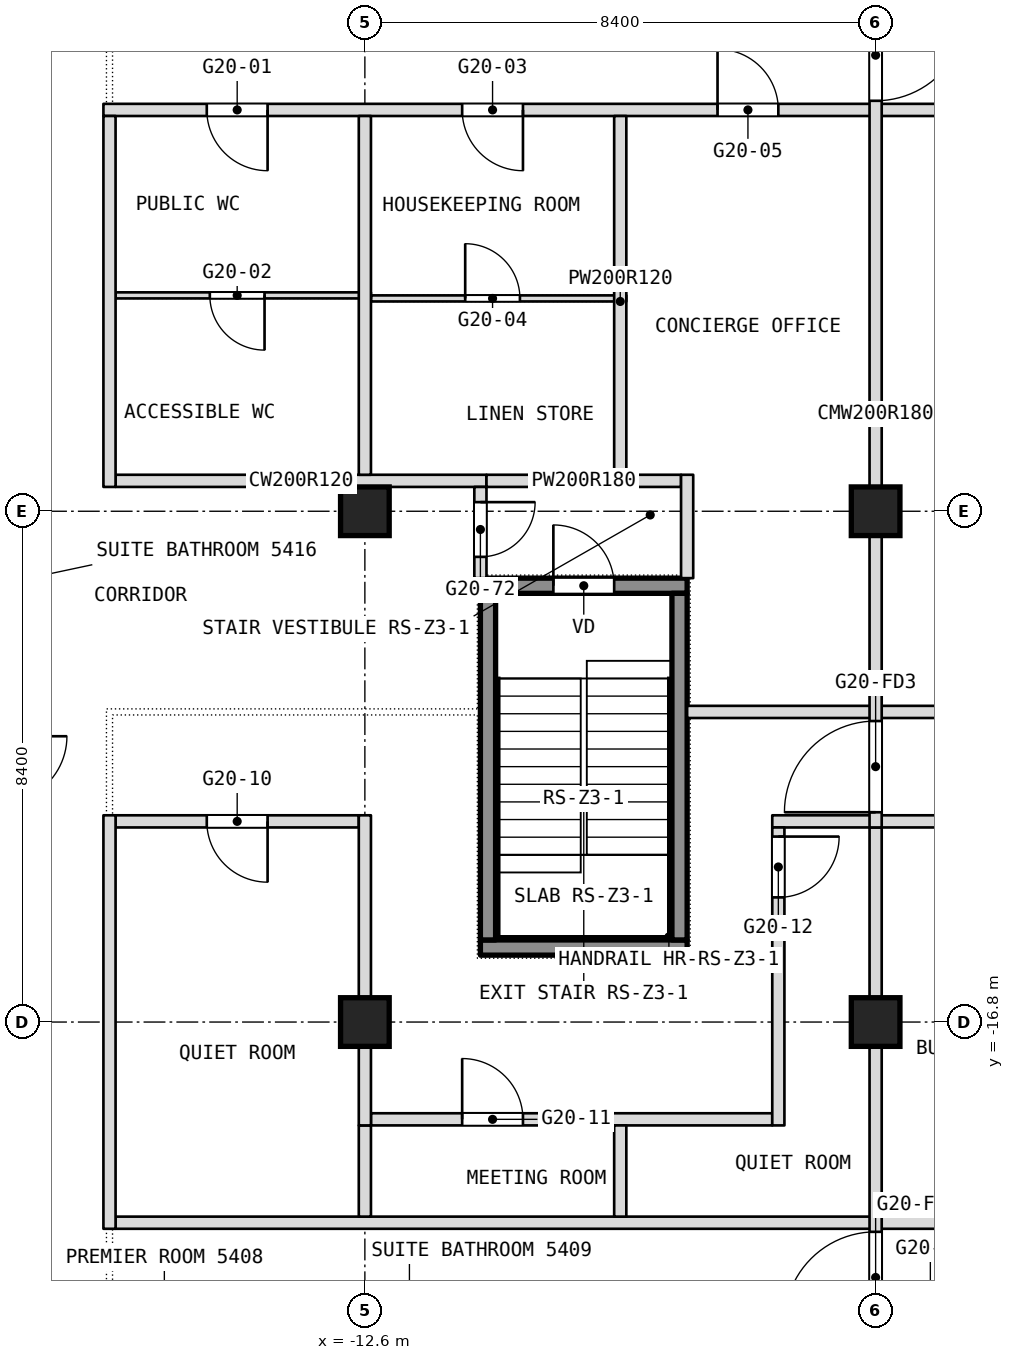
"""IFC4 building model, lengths in metres.
Left out: names, types, materials, properties, quantities, classifications, styles, units other than length and angle.
Written with IfcOpenShell. Run it as: python <this file> out.ifc"""

import sys

from ifc_helpers import new_model, si_unit, direction, frame, frame_2d, origin, origin_2d, place, context, subcontext, project, spatial, rectangle, extrude, element, fill, save


model = new_model("IFC4")
c1 = context("Model", 3, precision=1e-05, world=origin(), true_north=direction((0.0, 1.0)))
c2 = subcontext(c1, "Body", "Model", "MODEL_VIEW")
j1 = project(units=[si_unit("LENGTHUNIT", "METRE"), si_unit("PLANEANGLEUNIT", "RADIAN")], contexts=[c1])
p1 = place(None, origin())
s1 = spatial("IfcSite", under=j1, at=p1, CompositionType="ELEMENT")
p2 = place(p1, origin())
s2 = spatial("IfcBuilding", under=s1, at=p2, CompositionType="ELEMENT")
p3 = place(p2, frame((0.0, 0.0, 230.9)))
s3 = spatial("IfcBuildingStorey", under=s2, at=p3, CompositionType="ELEMENT", Elevation=230.9)
for number, where, z_axis, x_axis in (
    (1, (-12.6, -16.8, 0.0), (0.0, 0.0, 1.0), (1.0, 0.0, 0.0)),
    (2, (-12.6, -8.4, 0.0), (0.0, 0.0, 1.0), (1.0, 0.0, 0.0)),
    (3, (-4.2, -16.8, 0.0), (0.0, 0.0, 1.0), (1.0, 0.0, 0.0)),
    (4, (-4.2, -8.4, 0.0), (0.0, 0.0, 1.0), (1.0, 0.0, 0.0)),
):
    element("IfcColumn", number, at=place(p3, frame(where, z_axis=z_axis, x_axis=x_axis)), inside=s3, PredefinedType="COLUMN", context=c2, shape_type="SweptSolid", body=[
        extrude(rectangle(XDim=0.8, YDim=0.8, at=origin_2d()), origin(), (0.0, 0.0, 1.0), 3.6),
    ])
p4 = place(p3, frame((-16.7, -20.1, 0.0), z_axis=(0.0, 0.0, 1.0), x_axis=(1.0, 0.0, 0.0)))
e5 = element("IfcWall", 5, at=p4, inside=s3, PredefinedType="PARTITIONING", context=c2, shape_type="SweptSolid", body=[
    extrude(rectangle(XDim=33.4, YDim=0.2, at=frame_2d((16.7, 0.0))), origin(), (0.0, 0.0, 1.0), 3.34),
])
p5 = place(p3, frame((-12.5, -18.4, 0.0), z_axis=(0.0, 0.0, 1.0), x_axis=(1.0, 0.0, 0.0)))
e6 = element("IfcWall", 6, at=p5, inside=s3, PredefinedType="PARTITIONING", context=c2, shape_type="SweptSolid", body=[
    extrude(rectangle(XDim=6.6, YDim=0.2, at=frame_2d((3.3, 0.0))), origin(), (0.0, 0.0, 1.0), 3.34),
])
p6 = place(p5, frame((1.5, 0.0, 0.0)))
e7 = element("IfcOpeningElement", 7, at=p6, cuts=e6, PredefinedType="OPENING", context=c2, shape_type="SweptSolid", body=[
    extrude(rectangle(XDim=1.0, YDim=2.1, at=frame_2d((0.5, 1.05))), frame((0.0, 0.1, 0.0), z_axis=(0.0, -1.0, 0.0), x_axis=(1.0, 0.0, 0.0)), (0.0, 0.0, 1.0), 0.2),
])
p7 = place(p3, frame((-16.7, -13.5, 0.0), z_axis=(0.0, 0.0, 1.0), x_axis=(1.0, 0.0, 0.0)))
e8 = element("IfcWall", 8, at=p7, inside=s3, PredefinedType="PARTITIONING", context=c2, shape_type="SweptSolid", body=[
    extrude(rectangle(XDim=4.0, YDim=0.2, at=frame_2d((2.0, 0.0))), origin(), (0.0, 0.0, 1.0), 3.34),
])
p8 = place(p7, frame((1.5, 0.0, 0.0)))
e9 = element("IfcOpeningElement", 9, at=p8, cuts=e8, PredefinedType="OPENING", context=c2, shape_type="SweptSolid", body=[
    extrude(rectangle(XDim=1.0, YDim=2.1, at=frame_2d((0.5, 1.05))), frame((0.0, 0.1, 0.0), z_axis=(0.0, -1.0, 0.0), x_axis=(1.0, 0.0, 0.0)), (0.0, 0.0, 1.0), 0.2),
])
p9 = place(p3, frame((-5.9, -13.5, 0.0), z_axis=(0.0, 0.0, 1.0), x_axis=(1.0, 0.0, 0.0)))
e10 = element("IfcWall", 10, at=p9, inside=s3, PredefinedType="PARTITIONING", context=c2, shape_type="SweptSolid", body=[
    extrude(rectangle(XDim=11.6, YDim=0.2, at=frame_2d((5.8, 0.0))), origin(), (0.0, 0.0, 1.0), 3.34),
])
p10 = place(p9, frame((3.3, 0.0, 0.0)))
e11 = element("IfcOpeningElement", 11, at=p10, cuts=e10, PredefinedType="OPENING", context=c2, shape_type="SweptSolid", body=[
    extrude(rectangle(XDim=1.0, YDim=2.1, at=frame_2d((0.5, 1.05))), frame((0.0, 0.1, 0.0), z_axis=(0.0, -1.0, 0.0), x_axis=(1.0, 0.0, 0.0)), (0.0, 0.0, 1.0), 0.2),
])
p11 = place(p9, frame((7.5, 0.0, 0.0)))
e12 = element("IfcOpeningElement", 12, at=p11, cuts=e10, PredefinedType="OPENING", context=c2, shape_type="SweptSolid", body=[
    extrude(rectangle(XDim=1.0, YDim=2.1, at=frame_2d((0.5, 1.05))), frame((0.0, 0.1, 0.0), z_axis=(0.0, -1.0, 0.0), x_axis=(1.0, 0.0, 0.0)), (0.0, 0.0, 1.0), 0.2),
])
p12 = place(p3, frame((-7.3, -11.7, 0.0), z_axis=(0.0, 0.0, 1.0), x_axis=(1.0, 0.0, 0.0)))
e13 = element("IfcWall", 13, at=p12, inside=s3, PredefinedType="PARTITIONING", context=c2, shape_type="SweptSolid", body=[
    extrude(rectangle(XDim=14.6, YDim=0.2, at=frame_2d((7.3, 0.0))), origin(), (0.0, 0.0, 1.0), 3.34),
])
p13 = place(p3, frame((-16.7, -7.9, 0.0), z_axis=(0.0, 0.0, 1.0), x_axis=(1.0, 0.0, 0.0)))
e14 = element("IfcWall", 14, at=p13, inside=s3, PredefinedType="PARTITIONING", context=c2, shape_type="SweptSolid", body=[
    extrude(rectangle(XDim=6.1, YDim=0.2, at=frame_2d((3.05, 0.0))), origin(), (0.0, 0.0, 1.0), 3.34),
])
p14 = place(p3, frame((-10.6, -7.9, 0.0), z_axis=(0.0, 0.0, 1.0), x_axis=(1.0, 0.0, 0.0)))
e15 = element("IfcWall", 15, at=p14, inside=s3, PredefinedType="PARTITIONING", context=c2, shape_type="SweptSolid", body=[
    extrude(rectangle(XDim=3.2, YDim=0.2, at=frame_2d((1.6, 0.0))), origin(), (0.0, 0.0, 1.0), 3.34),
])
p15 = place(p3, frame((-12.5, -4.9, 0.0), z_axis=(0.0, 0.0, 1.0), x_axis=(1.0, 0.0, 0.0)))
e16 = element("IfcWall", 16, at=p15, inside=s3, PredefinedType="PARTITIONING", context=c2, shape_type="SweptSolid", body=[
    extrude(rectangle(XDim=4.2, YDim=0.1, at=frame_2d((2.1, 0.0))), origin(), (0.0, 0.0, 1.0), 3.34),
])
p16 = place(p15, frame((1.55, 0.0, 0.0)))
e17 = element("IfcOpeningElement", 17, at=p16, cuts=e16, PredefinedType="OPENING", context=c2, shape_type="SweptSolid", body=[
    extrude(rectangle(XDim=0.9, YDim=2.1, at=frame_2d((0.45, 1.05))), frame((0.0, 0.05, 0.0), z_axis=(0.0, -1.0, 0.0), x_axis=(1.0, 0.0, 0.0)), (0.0, 0.0, 1.0), 0.1),
])
p17 = place(p3, frame((-16.7, -4.85, 0.0), z_axis=(0.0, 0.0, 1.0), x_axis=(1.0, 0.0, 0.0)))
e18 = element("IfcWall", 18, at=p17, inside=s3, PredefinedType="PARTITIONING", context=c2, shape_type="SweptSolid", body=[
    extrude(rectangle(XDim=4.2, YDim=0.1, at=frame_2d((2.1, 0.0))), origin(), (0.0, 0.0, 1.0), 3.34),
])
p18 = place(p17, frame((1.55, 0.0, 0.0)))
e19 = element("IfcOpeningElement", 19, at=p18, cuts=e18, PredefinedType="OPENING", context=c2, shape_type="SweptSolid", body=[
    extrude(rectangle(XDim=0.9, YDim=2.1, at=frame_2d((0.45, 1.05))), frame((0.0, 0.05, 0.0), z_axis=(0.0, -1.0, 0.0), x_axis=(1.0, 0.0, 0.0)), (0.0, 0.0, 1.0), 0.1),
])
p19 = place(p3, frame((-16.9, -1.8, 0.0), z_axis=(0.0, 0.0, 1.0), x_axis=(1.0, 0.0, 0.0)))
e20 = element("IfcWall", 20, at=p19, inside=s3, PredefinedType="PARTITIONING", context=c2, shape_type="SweptSolid", body=[
    extrude(rectangle(XDim=33.8, YDim=0.2, at=frame_2d((16.9, 0.0))), origin(), (0.0, 0.0, 1.0), 3.34),
])
p20 = place(p19, frame((1.7, 0.0, 0.0)))
e21 = element("IfcOpeningElement", 21, at=p20, cuts=e20, PredefinedType="OPENING", context=c2, shape_type="SweptSolid", body=[
    extrude(rectangle(XDim=1.0, YDim=2.1, at=frame_2d((0.5, 1.05))), frame((0.0, 0.1, 0.0), z_axis=(0.0, -1.0, 0.0), x_axis=(1.0, 0.0, 0.0)), (0.0, 0.0, 1.0), 0.2),
])
p21 = place(p19, frame((5.9, 0.0, 0.0)))
e22 = element("IfcOpeningElement", 22, at=p21, cuts=e20, PredefinedType="OPENING", context=c2, shape_type="SweptSolid", body=[
    extrude(rectangle(XDim=1.0, YDim=2.1, at=frame_2d((0.5, 1.05))), frame((0.0, 0.1, 0.0), z_axis=(0.0, -1.0, 0.0), x_axis=(1.0, 0.0, 0.0)), (0.0, 0.0, 1.0), 0.2),
])
p22 = place(p19, frame((10.1, 0.0, 0.0)))
e23 = element("IfcOpeningElement", 23, at=p22, cuts=e20, PredefinedType="OPENING", context=c2, shape_type="SweptSolid", body=[
    extrude(rectangle(XDim=1.0, YDim=2.1, at=frame_2d((0.5, 1.05))), frame((0.0, 0.1, 0.0), z_axis=(0.0, -1.0, 0.0), x_axis=(1.0, 0.0, 0.0)), (0.0, 0.0, 1.0), 0.2),
])
p23 = place(p19, frame((16.0, 0.0, 0.0)))
e24 = element("IfcOpeningElement", 24, at=p23, cuts=e20, PredefinedType="OPENING", context=c2, shape_type="SweptSolid", body=[
    extrude(rectangle(XDim=1.8, YDim=2.1, at=frame_2d((0.9, 1.05))), frame((0.0, 0.1, 0.0), z_axis=(0.0, -1.0, 0.0), x_axis=(1.0, 0.0, 0.0)), (0.0, 0.0, 1.0), 0.2),
])
p24 = place(p19, frame((22.7, 0.0, 0.0)))
e25 = element("IfcOpeningElement", 25, at=p24, cuts=e20, PredefinedType="OPENING", context=c2, shape_type="SweptSolid", body=[
    extrude(rectangle(XDim=1.0, YDim=2.1, at=frame_2d((0.5, 1.05))), frame((0.0, 0.1, 0.0), z_axis=(0.0, -1.0, 0.0), x_axis=(1.0, 0.0, 0.0)), (0.0, 0.0, 1.0), 0.2),
])
p25 = place(p19, frame((26.9, 0.0, 0.0)))
e26 = element("IfcOpeningElement", 26, at=p25, cuts=e20, PredefinedType="OPENING", context=c2, shape_type="SweptSolid", body=[
    extrude(rectangle(XDim=1.0, YDim=2.1, at=frame_2d((0.5, 1.05))), frame((0.0, 0.1, 0.0), z_axis=(0.0, -1.0, 0.0), x_axis=(1.0, 0.0, 0.0)), (0.0, 0.0, 1.0), 0.2),
])
p26 = place(p19, frame((31.1, 0.0, 0.0)))
e27 = element("IfcOpeningElement", 27, at=p26, cuts=e20, PredefinedType="OPENING", context=c2, shape_type="SweptSolid", body=[
    extrude(rectangle(XDim=1.0, YDim=2.1, at=frame_2d((0.5, 1.05))), frame((0.0, 0.1, 0.0), z_axis=(0.0, -1.0, 0.0), x_axis=(1.0, 0.0, 0.0)), (0.0, 0.0, 1.0), 0.2),
])
p27 = place(p3, frame((-4.2, -22.0, 0.0), z_axis=(0.0, 0.0, 1.0), x_axis=(0.0, 1.0, 0.0)))
e28 = element("IfcWall", 28, at=p27, inside=s3, PredefinedType="PARTITIONING", context=c2, shape_type="SweptSolid", body=[
    extrude(rectangle(XDim=8.4, YDim=0.2, at=frame_2d((4.2, 0.0))), origin(), (0.0, 0.0, 1.0), 3.34),
])
p28 = place(p27, frame((0.25, 0.0, 0.0)))
e29 = element("IfcOpeningElement", 29, at=p28, cuts=e28, PredefinedType="OPENING", context=c2, shape_type="SweptSolid", body=[
    extrude(rectangle(XDim=1.5, YDim=2.1, at=frame_2d((0.75, 1.05))), frame((0.0, 0.1, 0.0), z_axis=(0.0, -1.0, 0.0), x_axis=(1.0, 0.0, 0.0)), (0.0, 0.0, 1.0), 0.2),
])
p29 = place(p3, frame((-4.2, -13.6, 0.0), z_axis=(0.0, 0.0, 1.0), x_axis=(0.0, 1.0, 0.0)))
e30 = element("IfcWall", 30, at=p29, inside=s3, PredefinedType="PARTITIONING", context=c2, shape_type="SweptSolid", body=[
    extrude(rectangle(XDim=13.6, YDim=0.2, at=frame_2d((6.8, 0.0))), origin(), (0.0, 0.0, 1.0), 3.34),
])
p30 = place(p29, frame((11.95, 0.0, 0.0)))
e31 = element("IfcOpeningElement", 31, at=p30, cuts=e30, PredefinedType="OPENING", context=c2, shape_type="SweptSolid", body=[
    extrude(rectangle(XDim=1.5, YDim=2.1, at=frame_2d((0.75, 1.05))), frame((0.0, 0.1, 0.0), z_axis=(0.0, -1.0, 0.0), x_axis=(1.0, 0.0, 0.0)), (0.0, 0.0, 1.0), 0.2),
])
p31 = place(p29, frame((0.25, 0.0, 0.0)))
e32 = element("IfcOpeningElement", 32, at=p31, cuts=e30, PredefinedType="OPENING", context=c2, shape_type="SweptSolid", body=[
    extrude(rectangle(XDim=1.5, YDim=2.1, at=frame_2d((0.75, 1.05))), frame((0.0, 0.1, 0.0), z_axis=(0.0, -1.0, 0.0), x_axis=(1.0, 0.0, 0.0)), (0.0, 0.0, 1.0), 0.2),
])
p32 = place(p3, frame((-5.8, -18.5, 0.0), z_axis=(0.0, 0.0, 1.0), x_axis=(0.0, 1.0, 0.0)))
e33 = element("IfcWall", 33, at=p32, inside=s3, PredefinedType="PARTITIONING", context=c2, shape_type="SweptSolid", body=[
    extrude(rectangle(XDim=4.9, YDim=0.2, at=frame_2d((2.45, 0.0))), origin(), (0.0, 0.0, 1.0), 3.34),
])
p33 = place(p32, frame((3.75, 0.0, 0.0)))
e34 = element("IfcOpeningElement", 34, at=p33, cuts=e33, PredefinedType="OPENING", context=c2, shape_type="SweptSolid", body=[
    extrude(rectangle(XDim=1.0, YDim=2.1, at=frame_2d((0.5, 1.05))), frame((0.0, 0.1, 0.0), z_axis=(0.0, -1.0, 0.0), x_axis=(1.0, 0.0, 0.0)), (0.0, 0.0, 1.0), 0.2),
])
p34 = place(p3, frame((-7.3, -9.5, 0.0), z_axis=(0.0, 0.0, 1.0), x_axis=(0.0, 1.0, 0.0)))
e35 = element("IfcWall", 35, at=p34, inside=s3, PredefinedType="PARTITIONING", context=c2, shape_type="SweptSolid", body=[
    extrude(rectangle(XDim=1.7, YDim=0.2, at=frame_2d((0.85, 0.0))), origin(), (0.0, 0.0, 1.0), 3.34),
])
p35 = place(p3, frame((-8.4, -20.0, 0.0), z_axis=(0.0, 0.0, 1.0), x_axis=(0.0, 1.0, 0.0)))
e36 = element("IfcWall", 36, at=p35, inside=s3, PredefinedType="PARTITIONING", context=c2, shape_type="SweptSolid", body=[
    extrude(rectangle(XDim=1.5, YDim=0.2, at=frame_2d((0.75, 0.0))), origin(), (0.0, 0.0, 1.0), 3.34),
])
p36 = place(p3, frame((-8.4, -8.0, 0.0), z_axis=(0.0, 0.0, 1.0), x_axis=(0.0, 1.0, 0.0)))
e37 = element("IfcWall", 37, at=p36, inside=s3, PredefinedType="PARTITIONING", context=c2, shape_type="SweptSolid", body=[
    extrude(rectangle(XDim=6.1, YDim=0.2, at=frame_2d((3.05, 0.0))), origin(), (0.0, 0.0, 1.0), 3.34),
])
p37 = place(p3, frame((-10.7, -9.5, 0.0), z_axis=(0.0, 0.0, 1.0), x_axis=(0.0, 1.0, 0.0)))
e38 = element("IfcWall", 38, at=p37, inside=s3, PredefinedType="PARTITIONING", context=c2, shape_type="SweptSolid", body=[
    extrude(rectangle(XDim=1.5, YDim=0.2, at=frame_2d((0.75, 0.0))), origin(), (0.0, 0.0, 1.0), 3.34),
])
p38 = place(p37, frame((0.35, 0.0, 0.0)))
e39 = element("IfcOpeningElement", 39, at=p38, cuts=e38, PredefinedType="OPENING", context=c2, shape_type="SweptSolid", body=[
    extrude(rectangle(XDim=0.9, YDim=2.1, at=frame_2d((0.45, 1.05))), frame((0.0, 0.1, 0.0), z_axis=(0.0, -1.0, 0.0), x_axis=(1.0, 0.0, 0.0)), (0.0, 0.0, 1.0), 0.2),
])
p39 = place(p3, frame((-12.6, -20.0, 0.0), z_axis=(0.0, 0.0, 1.0), x_axis=(0.0, 1.0, 0.0)))
e40 = element("IfcWall", 40, at=p39, inside=s3, PredefinedType="PARTITIONING", context=c2, shape_type="SweptSolid", body=[
    extrude(rectangle(XDim=1.5, YDim=0.2, at=frame_2d((0.75, 0.0))), origin(), (0.0, 0.0, 1.0), 3.34),
])
p40 = place(p3, frame((-12.6, -7.8, 0.0), z_axis=(0.0, 0.0, 1.0), x_axis=(0.0, 1.0, 0.0)))
e41 = element("IfcWall", 41, at=p40, inside=s3, PredefinedType="PARTITIONING", context=c2, shape_type="SweptSolid", body=[
    extrude(rectangle(XDim=5.9, YDim=0.2, at=frame_2d((2.95, 0.0))), origin(), (0.0, 0.0, 1.0), 3.34),
])
p41 = place(p3, frame((-12.6, -18.5, 0.0), z_axis=(0.0, 0.0, 1.0), x_axis=(0.0, 1.0, 0.0)))
e42 = element("IfcWall", 42, at=p41, inside=s3, PredefinedType="PARTITIONING", context=c2, shape_type="SweptSolid", body=[
    extrude(rectangle(XDim=5.1, YDim=0.2, at=frame_2d((2.55, 0.0))), origin(), (0.0, 0.0, 1.0), 3.34),
])
p42 = place(p3, frame((-16.8, -20.2, 0.0), z_axis=(0.0, 0.0, 1.0), x_axis=(0.0, 1.0, 0.0)))
e43 = element("IfcWall", 43, at=p42, inside=s3, PredefinedType="PARTITIONING", context=c2, shape_type="SweptSolid", body=[
    extrude(rectangle(XDim=6.8, YDim=0.2, at=frame_2d((3.4, 0.0))), origin(), (0.0, 0.0, 1.0), 3.34),
])
p43 = place(p3, frame((-16.8, -8.0, 0.0), z_axis=(0.0, 0.0, 1.0), x_axis=(0.0, 1.0, 0.0)))
e44 = element("IfcWall", 44, at=p43, inside=s3, PredefinedType="PARTITIONING", context=c2, shape_type="SweptSolid", body=[
    extrude(rectangle(XDim=6.1, YDim=0.2, at=frame_2d((3.05, 0.0))), origin(), (0.0, 0.0, 1.0), 3.34),
])
p44 = place(p3, frame((-10.7, -15.575, 0.1), z_axis=(0.0, 0.0, 1.0), x_axis=(1.0, 0.0, 0.0)))
e45 = element("IfcWall", 45, at=p44, inside=s3, PredefinedType="SHEAR", context=c2, shape_type="SweptSolid", body=[
    extrude(rectangle(XDim=3.4, YDim=0.25, at=frame_2d((1.7, 0.0))), origin(), (0.0, 0.0, 1.0), 3.6),
])
p45 = place(p3, frame((-10.7, -9.625, 0.1), z_axis=(0.0, 0.0, 1.0), x_axis=(1.0, 0.0, 0.0)))
e46 = element("IfcWall", 46, at=p45, inside=s3, PredefinedType="SHEAR", context=c2, shape_type="SweptSolid", body=[
    extrude(rectangle(XDim=3.4, YDim=0.25, at=frame_2d((1.7, 0.0))), origin(), (0.0, 0.0, 1.0), 3.6),
])
p46 = place(p45, frame((1.2, 0.0, 0.0)))
e47 = element("IfcOpeningElement", 47, at=p46, cuts=e46, PredefinedType="OPENING", context=c2, shape_type="SweptSolid", body=[
    extrude(rectangle(XDim=1.0, YDim=2.1, at=frame_2d((0.5, 1.05))), frame((0.0, 0.125, 0.0), z_axis=(0.0, -1.0, 0.0), x_axis=(1.0, 0.0, 0.0)), (0.0, 0.0, 1.0), 0.25),
])
for number, where, z_axis, x_axis in (
    (48, (-10.575, -15.45, 0.1), (0.0, 0.0, 1.0), (0.0, 1.0, 0.0)),
    (49, (-7.425, -15.45, 0.1), (0.0, 0.0, 1.0), (0.0, 1.0, 0.0)),
):
    element("IfcWall", number, at=place(p3, frame(where, z_axis=z_axis, x_axis=x_axis)), inside=s3, PredefinedType="SHEAR", context=c2, shape_type="SweptSolid", body=[
        extrude(rectangle(XDim=5.7, YDim=0.25, at=frame_2d((2.85, 0.0))), origin(), (0.0, 0.0, 1.0), 3.6),
    ])
p47 = place(p6, origin())
e50 = element("IfcDoor", 50, at=p47, inside=s3, OperationType="SINGLE_SWING_RIGHT", PredefinedType="DOOR", context=c2, shape_type="SweptSolid", body=[
    extrude(rectangle(XDim=1.0, YDim=2.1, at=frame_2d((0.5, 1.05))), frame((0.0, 0.025, 0.0), z_axis=(0.0, -1.0, 0.0), x_axis=(1.0, 0.0, 0.0)), (0.0, 0.0, 1.0), 0.05),
])
fill(e7, e50)
p48 = place(p8, origin())
e51 = element("IfcDoor", 51, at=p48, inside=s3, OperationType="SINGLE_SWING_RIGHT", PredefinedType="DOOR", context=c2, shape_type="SweptSolid", body=[
    extrude(rectangle(XDim=1.0, YDim=2.1, at=frame_2d((0.5, 1.05))), frame((0.0, 0.025, 0.0), z_axis=(0.0, -1.0, 0.0), x_axis=(1.0, 0.0, 0.0)), (0.0, 0.0, 1.0), 0.05),
])
fill(e9, e51)
p49 = place(p16, origin())
e52 = element("IfcDoor", 52, at=p49, inside=s3, OperationType="SINGLE_SWING_RIGHT", PredefinedType="DOOR", context=c2, shape_type="SweptSolid", body=[
    extrude(rectangle(XDim=0.9, YDim=2.1, at=frame_2d((0.45, 1.05))), frame((0.0, 0.025, 0.0), z_axis=(0.0, -1.0, 0.0), x_axis=(1.0, 0.0, 0.0)), (0.0, 0.0, 1.0), 0.05),
])
fill(e17, e52)
p50 = place(p18, origin())
e53 = element("IfcDoor", 53, at=p50, inside=s3, OperationType="SINGLE_SWING_RIGHT", PredefinedType="DOOR", context=c2, shape_type="SweptSolid", body=[
    extrude(rectangle(XDim=0.9, YDim=2.1, at=frame_2d((0.45, 1.05))), frame((0.0, 0.025, 0.0), z_axis=(0.0, -1.0, 0.0), x_axis=(1.0, 0.0, 0.0)), (0.0, 0.0, 1.0), 0.05),
])
fill(e19, e53)
p51 = place(p20, origin())
e54 = element("IfcDoor", 54, at=p51, inside=s3, OperationType="SINGLE_SWING_LEFT", PredefinedType="DOOR", context=c2, shape_type="SweptSolid", body=[
    extrude(rectangle(XDim=1.0, YDim=2.1, at=frame_2d((0.5, 1.05))), frame((0.0, 0.025, 0.0), z_axis=(0.0, -1.0, 0.0), x_axis=(1.0, 0.0, 0.0)), (0.0, 0.0, 1.0), 0.05),
])
fill(e21, e54)
p52 = place(p21, origin())
e55 = element("IfcDoor", 55, at=p52, inside=s3, OperationType="SINGLE_SWING_LEFT", PredefinedType="DOOR", context=c2, shape_type="SweptSolid", body=[
    extrude(rectangle(XDim=1.0, YDim=2.1, at=frame_2d((0.5, 1.05))), frame((0.0, 0.025, 0.0), z_axis=(0.0, -1.0, 0.0), x_axis=(1.0, 0.0, 0.0)), (0.0, 0.0, 1.0), 0.05),
])
fill(e22, e55)
p53 = place(p22, origin())
e56 = element("IfcDoor", 56, at=p53, inside=s3, OperationType="SINGLE_SWING_RIGHT", PredefinedType="DOOR", context=c2, shape_type="SweptSolid", body=[
    extrude(rectangle(XDim=1.0, YDim=2.1, at=frame_2d((0.5, 1.05))), frame((0.0, 0.025, 0.0), z_axis=(0.0, -1.0, 0.0), x_axis=(1.0, 0.0, 0.0)), (0.0, 0.0, 1.0), 0.05),
])
fill(e23, e56)
p54 = place(p33, origin())
e57 = element("IfcDoor", 57, at=p54, inside=s3, OperationType="SINGLE_SWING_RIGHT", PredefinedType="DOOR", context=c2, shape_type="SweptSolid", body=[
    extrude(rectangle(XDim=1.0, YDim=2.1, at=frame_2d((0.5, 1.05))), frame((0.0, 0.025, 0.0), z_axis=(0.0, -1.0, 0.0), x_axis=(1.0, 0.0, 0.0)), (0.0, 0.0, 1.0), 0.05),
])
fill(e34, e57)
p55 = place(p38, origin())
e58 = element("IfcDoor", 58, at=p55, inside=s3, OperationType="SINGLE_SWING_LEFT", PredefinedType="DOOR", context=c2, shape_type="SweptSolid", body=[
    extrude(rectangle(XDim=0.9, YDim=2.1, at=frame_2d((0.45, 1.05))), frame((0.0, 0.025, 0.0), z_axis=(0.0, -1.0, 0.0), x_axis=(1.0, 0.0, 0.0)), (0.0, 0.0, 1.0), 0.05),
])
fill(e39, e58)
p56 = place(p46, origin())
e59 = element("IfcDoor", 59, at=p56, inside=s3, OperationType="SINGLE_SWING_LEFT", PredefinedType="DOOR", context=c2, shape_type="SweptSolid", body=[
    extrude(rectangle(XDim=1.0, YDim=2.1, at=frame_2d((0.5, 1.05))), frame((0.0, 0.025, 0.0), z_axis=(0.0, -1.0, 0.0), x_axis=(1.0, 0.0, 0.0)), (0.0, 0.0, 1.0), 0.05),
])
fill(e47, e59)
p57 = place(p30, origin())
e60 = element("IfcDoor", 60, at=p57, inside=s3, OperationType="DOUBLE_DOOR_DOUBLE_SWING", PredefinedType="DOOR", context=c2, shape_type="SweptSolid", body=[
    extrude(rectangle(XDim=1.5, YDim=2.1, at=frame_2d((0.75, 1.05))), frame((0.0, 0.025, 0.0), z_axis=(0.0, -1.0, 0.0), x_axis=(1.0, 0.0, 0.0)), (0.0, 0.0, 1.0), 0.05),
])
fill(e31, e60)
p58 = place(p31, origin())
e61 = element("IfcDoor", 61, at=p58, inside=s3, OperationType="DOUBLE_DOOR_DOUBLE_SWING", PredefinedType="DOOR", context=c2, shape_type="SweptSolid", body=[
    extrude(rectangle(XDim=1.5, YDim=2.1, at=frame_2d((0.75, 1.05))), frame((0.0, 0.025, 0.0), z_axis=(0.0, -1.0, 0.0), x_axis=(1.0, 0.0, 0.0)), (0.0, 0.0, 1.0), 0.05),
])
fill(e32, e61)
p59 = place(p28, origin())
e62 = element("IfcDoor", 62, at=p59, inside=s3, OperationType="DOUBLE_DOOR_DOUBLE_SWING", PredefinedType="DOOR", context=c2, shape_type="SweptSolid", body=[
    extrude(rectangle(XDim=1.5, YDim=2.1, at=frame_2d((0.75, 1.05))), frame((0.0, 0.025, 0.0), z_axis=(0.0, -1.0, 0.0), x_axis=(1.0, 0.0, 0.0)), (0.0, 0.0, 1.0), 0.05),
])
fill(e29, e62)
save(model, sys.argv[1])
